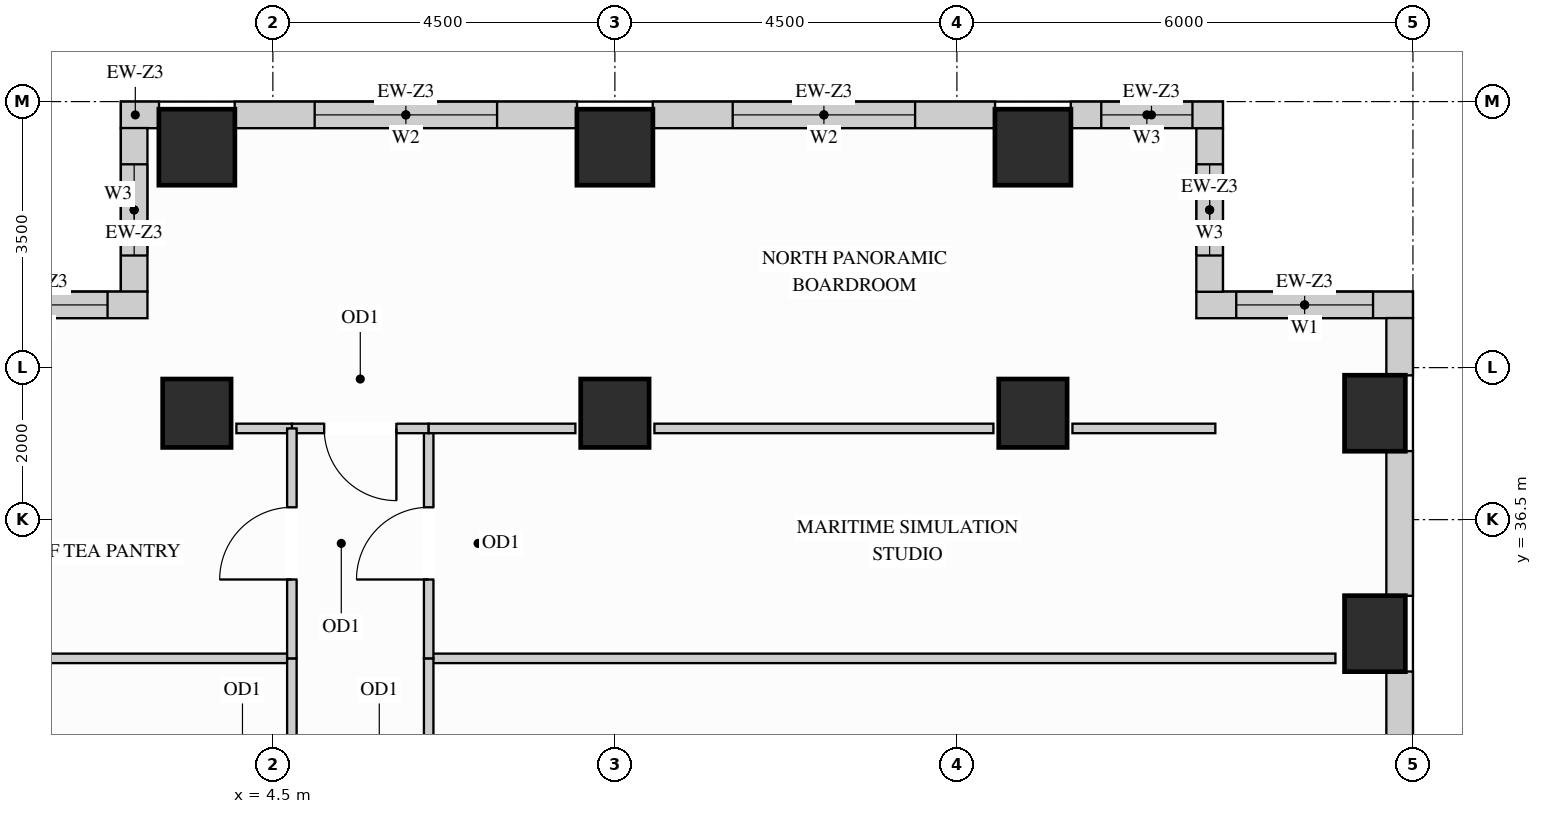
"""IFC4 building model, lengths in metres.
Left out: names, types, materials, properties, quantities, classifications, styles, units other than length and angle.
Written with IfcOpenShell. Run it as: python <this file> out.ifc"""

import sys

from ifc_helpers import new_model, si_unit, direction, frame, frame_2d, origin, origin_2d, place, context, subcontext, project, spatial, rectangle, extrude, source, transform, mapped, element, fill, save


model = new_model("IFC4")
c1 = context("Model", 3, precision=1e-05, world=origin(), true_north=direction((0.0, 1.0)))
c2 = subcontext(c1, "Body", "Model", "MODEL_VIEW")
j1 = project(units=[si_unit("LENGTHUNIT", "METRE"), si_unit("PLANEANGLEUNIT", "RADIAN")], contexts=[c1])
p1 = place(None, origin())
s1 = spatial("IfcSite", under=j1, at=p1, CompositionType="ELEMENT")
p2 = place(p1, origin())
s2 = spatial("IfcBuilding", under=s1, at=p2, CompositionType="ELEMENT")
p3 = place(p2, frame((0.0, 0.0, 168.3)))
s3 = spatial("IfcBuildingStorey", under=s2, at=p3, CompositionType="ELEMENT", Elevation=168.3)
m1 = source(origin(), c2, "Body", "SweptSolid", [
    extrude(rectangle(XDim=0.9, YDim=0.9, at=origin_2d()), origin(), (0.0, 0.0, 1.0), 3.4),
])
for number, where, z_axis, x_axis in (
    (1, (14.5, 37.9, 0.0), (0.0, 0.0, 1.0), (1.0, 0.0, 0.0)),
    (2, (3.5, 37.9, 0.0), (0.0, 0.0, 1.0), (1.0, 0.0, 0.0)),
    (3, (9.0, 37.9, 0.0), (0.0, 0.0, 1.0), (1.0, 0.0, 0.0)),
):
    element("IfcColumn", number, at=place(p3, frame(where, z_axis=z_axis, x_axis=x_axis)), inside=s3, PredefinedType="COLUMN", context=c2, shape_type="MappedRepresentation", body=[
        mapped(m1, transform((0.0, 0.0, 0.0), x_axis=(1.0, 0.0, 0.0), y_axis=(0.0, 1.0, 0.0), z_axis=(0.0, 0.0, 1.0))),
    ])
m2 = source(origin(), c2, "Body", "SweptSolid", [
    extrude(rectangle(XDim=0.8, YDim=1.0, at=origin_2d()), origin(), (0.0, 0.0, 1.0), 3.4),
])
for number, where, z_axis, x_axis in (
    (4, (19.0, 35.0, 0.0), (0.0, 0.0, 1.0), (1.0, 0.0, 0.0)),
    (5, (19.0, 37.9, 0.0), (0.0, 0.0, 1.0), (1.0, 0.0, 0.0)),
):
    element("IfcColumn", number, at=place(p3, frame(where, z_axis=z_axis, x_axis=x_axis)), inside=s3, PredefinedType="COLUMN", context=c2, shape_type="MappedRepresentation", body=[
        mapped(m2, transform((0.0, 0.0, 0.0), x_axis=(1.0, 0.0, 0.0), y_axis=(0.0, 1.0, 0.0), z_axis=(0.0, 0.0, 1.0))),
    ])
m3 = source(origin(), c2, "Body", "SweptSolid", [
    extrude(rectangle(XDim=1.0, YDim=1.0, at=origin_2d()), origin(), (0.0, 0.0, 1.0), 3.4),
])
for number, where, z_axis, x_axis in (
    (6, (14.5, 41.4, 0.0), (0.0, 0.0, 1.0), (1.0, 0.0, 0.0)),
    (7, (3.5, 41.4, 0.0), (0.0, 0.0, 1.0), (1.0, 0.0, 0.0)),
    (8, (9.0, 41.4, 0.0), (0.0, 0.0, 1.0), (1.0, 0.0, 0.0)),
):
    element("IfcColumn", number, at=place(p3, frame(where, z_axis=z_axis, x_axis=x_axis)), inside=s3, PredefinedType="COLUMN", context=c2, shape_type="MappedRepresentation", body=[
        mapped(m3, transform((0.0, 0.0, 0.0), x_axis=(1.0, 0.0, 0.0), y_axis=(0.0, 1.0, 0.0), z_axis=(0.0, 0.0, 1.0))),
    ])
p4 = place(p3, frame((19.5, 39.325, 0.0), z_axis=(0.0, 0.0, 1.0), x_axis=(-1.0, 0.0, 0.0)))
e9 = element("IfcWall", 9, at=p4, inside=s3, PredefinedType="SOLIDWALL", context=c2, shape_type="SweptSolid", body=[
    extrude(rectangle(XDim=2.85, YDim=0.35, at=frame_2d((1.425, 0.0))), origin(), (0.0, 0.0, 1.0), 3.385),
])
p5 = place(p4, frame((0.525, 0.0, 0.78)))
e10 = element("IfcOpeningElement", 10, at=p5, cuts=e9, PredefinedType="OPENING", context=c2, shape_type="SweptSolid", body=[
    extrude(rectangle(XDim=1.8, YDim=2.1, at=frame_2d((0.9, 1.05))), frame((0.0, 0.185, 0.0), z_axis=(0.0, -1.0, 0.0), x_axis=(1.0, 0.0, 0.0)), (0.0, 0.0, 1.0), 0.37),
])
p6 = place(p3, frame((16.825, 39.498, 0.0), z_axis=(0.0, 0.0, 1.0), x_axis=(0.0, 1.0, 0.0)))
e11 = element("IfcWall", 11, at=p6, inside=s3, PredefinedType="SOLIDWALL", context=c2, shape_type="SweptSolid", body=[
    extrude(rectangle(XDim=2.154, YDim=0.35, at=frame_2d((1.077, 0.0))), origin(), (0.0, 0.0, 1.0), 3.385),
])
p7 = place(p6, frame((0.477, 0.0, 0.78)))
e12 = element("IfcOpeningElement", 12, at=p7, cuts=e11, PredefinedType="OPENING", context=c2, shape_type="SweptSolid", body=[
    extrude(rectangle(XDim=1.2, YDim=2.1, at=frame_2d((0.6, 1.05))), frame((0.0, 0.185, 0.0), z_axis=(0.0, -1.0, 0.0), x_axis=(1.0, 0.0, 0.0)), (0.0, 0.0, 1.0), 0.37),
])
p8 = place(p3, frame((17.0, 41.825, 0.0), z_axis=(0.0, 0.0, 1.0), x_axis=(-1.0, 0.0, 0.0)))
e13 = element("IfcWall", 13, at=p8, inside=s3, PredefinedType="SOLIDWALL", context=c2, shape_type="SweptSolid", body=[
    extrude(rectangle(XDim=2.002, YDim=0.35, at=frame_2d((1.001, 0.0))), origin(), (0.0, 0.0, 1.0), 3.385),
])
p9 = place(p8, frame((0.401, 0.0, 0.78)))
e14 = element("IfcOpeningElement", 14, at=p9, cuts=e13, PredefinedType="OPENING", context=c2, shape_type="SweptSolid", body=[
    extrude(rectangle(XDim=1.2, YDim=2.1, at=frame_2d((0.6, 1.05))), frame((0.0, 0.185, 0.0), z_axis=(0.0, -1.0, 0.0), x_axis=(1.0, 0.0, 0.0)), (0.0, 0.0, 1.0), 0.37),
])
p10 = place(p3, frame((14.002, 41.825, 0.0), z_axis=(0.0, 0.0, 1.0), x_axis=(-1.0, 0.0, 0.0)))
e15 = element("IfcWall", 15, at=p10, inside=s3, PredefinedType="SOLIDWALL", context=c2, shape_type="SweptSolid", body=[
    extrude(rectangle(XDim=4.504, YDim=0.35, at=frame_2d((2.252, 0.0))), origin(), (0.0, 0.0, 1.0), 2.612),
])
p11 = place(p10, frame((1.052, 0.0, 0.78)))
e16 = element("IfcOpeningElement", 16, at=p11, cuts=e15, PredefinedType="OPENING", context=c2, shape_type="SweptSolid", body=[
    extrude(rectangle(XDim=2.4, YDim=1.652, at=frame_2d((1.2, 0.826))), frame((0.0, 0.185, 0.0), z_axis=(0.0, -1.0, 0.0), x_axis=(1.0, 0.0, 0.0)), (0.0, 0.0, 1.0), 0.37),
])
p12 = place(p3, frame((8.502, 41.825, 0.0), z_axis=(0.0, 0.0, 1.0), x_axis=(-1.0, 0.0, 0.0)))
e17 = element("IfcWall", 17, at=p12, inside=s3, PredefinedType="SOLIDWALL", context=c2, shape_type="SweptSolid", body=[
    extrude(rectangle(XDim=4.504, YDim=0.35, at=frame_2d((2.252, 0.0))), origin(), (0.0, 0.0, 1.0), 2.612),
])
p13 = place(p12, frame((1.052, 0.0, 0.78)))
e18 = element("IfcOpeningElement", 18, at=p13, cuts=e17, PredefinedType="OPENING", context=c2, shape_type="SweptSolid", body=[
    extrude(rectangle(XDim=2.4, YDim=1.652, at=frame_2d((1.2, 0.826))), frame((0.0, 0.185, 0.0), z_axis=(0.0, -1.0, 0.0), x_axis=(1.0, 0.0, 0.0)), (0.0, 0.0, 1.0), 0.37),
])
m4 = source(origin(), c2, "Body", "SweptSolid", [
    extrude(rectangle(XDim=0.502, YDim=0.35, at=frame_2d((0.251, 0.0))), origin(), (0.0, 0.0, 1.0), 3.385),
])
p14 = place(p3, frame((3.002, 41.825, 0.0), z_axis=(0.0, 0.0, 1.0), x_axis=(-1.0, 0.0, 0.0)))
e19 = element("IfcWall", 19, at=p14, inside=s3, PredefinedType="SOLIDWALL", context=c2, shape_type="MappedRepresentation", body=[
    mapped(m4, transform((0.0, 0.0, 0.0), x_axis=(1.0, 0.0, 0.0), y_axis=(0.0, 1.0, 0.0), z_axis=(0.0, 0.0, 1.0))),
])
p15 = place(p3, frame((2.675, 41.652, 0.0), z_axis=(0.0, 0.0, 1.0), x_axis=(0.0, -1.0, 0.0)))
e20 = element("IfcWall", 20, at=p15, inside=s3, PredefinedType="SOLIDWALL", context=c2, shape_type="SweptSolid", body=[
    extrude(rectangle(XDim=2.154, YDim=0.35, at=frame_2d((1.077, 0.0))), origin(), (0.0, 0.0, 1.0), 3.385),
])
p16 = place(p15, frame((0.477, 0.0, 0.78)))
e21 = element("IfcOpeningElement", 21, at=p16, cuts=e20, PredefinedType="OPENING", context=c2, shape_type="SweptSolid", body=[
    extrude(rectangle(XDim=1.2, YDim=2.1, at=frame_2d((0.6, 1.05))), frame((0.0, 0.185, 0.0), z_axis=(0.0, -1.0, 0.0), x_axis=(1.0, 0.0, 0.0)), (0.0, 0.0, 1.0), 0.37),
])
p17 = place(p3, frame((2.85, 39.325, 0.0), z_axis=(0.0, 0.0, 1.0), x_axis=(-1.0, 0.0, 0.0)))
e22 = element("IfcWall", 22, at=p17, inside=s3, PredefinedType="SOLIDWALL", context=c2, shape_type="SweptSolid", body=[
    extrude(rectangle(XDim=2.85, YDim=0.35, at=frame_2d((1.425, 0.0))), origin(), (0.0, 0.0, 1.0), 3.385),
])
p18 = place(p17, frame((0.525, 0.0, 0.78)))
e23 = element("IfcOpeningElement", 23, at=p18, cuts=e22, PredefinedType="OPENING", context=c2, shape_type="SweptSolid", body=[
    extrude(rectangle(XDim=1.8, YDim=2.1, at=frame_2d((0.9, 1.05))), frame((0.0, 0.185, 0.0), z_axis=(0.0, -1.0, 0.0), x_axis=(1.0, 0.0, 0.0)), (0.0, 0.0, 1.0), 0.37),
])
m5 = source(origin(), c2, "Body", "SweptSolid", [
    extrude(rectangle(XDim=3.504, YDim=0.35, at=frame_2d((1.752, 0.0))), origin(), (0.0, 0.0, 1.0), 2.612),
])
p19 = place(p3, frame((19.325, 30.998, 0.0), z_axis=(0.0, 0.0, 1.0), x_axis=(0.0, 1.0, 0.0)))
e24 = element("IfcWall", 24, at=p19, inside=s3, PredefinedType="SOLIDWALL", context=c2, shape_type="MappedRepresentation", body=[
    mapped(m5, transform((0.0, 0.0, 0.0), x_axis=(1.0, 0.0, 0.0), y_axis=(0.0, 1.0, 0.0), z_axis=(0.0, 0.0, 1.0))),
])
m6 = source(origin(), c2, "Body", "SweptSolid", [
    extrude(rectangle(XDim=1.904, YDim=0.35, at=frame_2d((0.952, 0.0))), origin(), (0.0, 0.0, 1.0), 2.612),
])
p20 = place(p3, frame((19.325, 35.498, 0.0), z_axis=(0.0, 0.0, 1.0), x_axis=(0.0, 1.0, 0.0)))
e25 = element("IfcWall", 25, at=p20, inside=s3, PredefinedType="SOLIDWALL", context=c2, shape_type="MappedRepresentation", body=[
    mapped(m6, transform((0.0, 0.0, 0.0), x_axis=(1.0, 0.0, 0.0), y_axis=(0.0, 1.0, 0.0), z_axis=(0.0, 0.0, 1.0))),
])
m7 = source(origin(), c2, "Body", "SweptSolid", [
    extrude(rectangle(XDim=0.754, YDim=0.35, at=frame_2d((0.377, 0.0))), origin(), (0.0, 0.0, 1.0), 3.385),
])
p21 = place(p3, frame((19.325, 38.398, 0.0), z_axis=(0.0, 0.0, 1.0), x_axis=(0.0, 1.0, 0.0)))
e26 = element("IfcWall", 26, at=p21, inside=s3, PredefinedType="SOLIDWALL", context=c2, shape_type="MappedRepresentation", body=[
    mapped(m7, transform((0.0, 0.0, 0.0), x_axis=(1.0, 0.0, 0.0), y_axis=(0.0, 1.0, 0.0), z_axis=(0.0, 0.0, 1.0))),
])
m8 = source(origin(), c2, "Body", "SweptSolid", [
    extrude(rectangle(XDim=11.93, YDim=0.125, at=frame_2d((5.965, 0.0))), origin(), (0.0, 0.0, 1.0), 2.448),
])
p22 = place(p3, frame((6.55, 34.675, 0.0), z_axis=(0.0, 0.0, 1.0), x_axis=(1.0, 0.0, 0.0)))
e27 = element("IfcWall", 27, at=p22, inside=s3, PredefinedType="PARTITIONING", context=c2, shape_type="MappedRepresentation", body=[
    mapped(m8, transform((0.0, 0.0, 0.0), x_axis=(1.0, 0.0, 0.0), y_axis=(0.0, 1.0, 0.0), z_axis=(0.0, 0.0, 1.0))),
])
m9 = source(origin(), c2, "Body", "SweptSolid", [
    extrude(rectangle(XDim=3.63, YDim=0.125, at=frame_2d((1.815, 0.0))), origin(), (0.0, 0.0, 1.0), 2.448),
])
p23 = place(p3, frame((1.12, 34.675, 0.0), z_axis=(0.0, 0.0, 1.0), x_axis=(1.0, 0.0, 0.0)))
e28 = element("IfcWall", 28, at=p23, inside=s3, PredefinedType="PARTITIONING", context=c2, shape_type="MappedRepresentation", body=[
    mapped(m9, transform((0.0, 0.0, 0.0), x_axis=(1.0, 0.0, 0.0), y_axis=(0.0, 1.0, 0.0), z_axis=(0.0, 0.0, 1.0))),
])
p24 = place(p3, frame((6.55, 31.65, 0.0), z_axis=(0.0, 0.0, 1.0), x_axis=(0.0, 1.0, 0.0)))
e29 = element("IfcWall", 29, at=p24, inside=s3, PredefinedType="PARTITIONING", context=c2, shape_type="SweptSolid", body=[
    extrude(rectangle(XDim=3.025, YDim=0.125, at=frame_2d((1.513, 0.0))), origin(), (0.0, 0.0, 1.0), 3.385),
])
p25 = place(p24, frame((1.038, 0.0, 0.0)))
e30 = element("IfcOpeningElement", 30, at=p25, cuts=e29, PredefinedType="OPENING", context=c2, shape_type="SweptSolid", body=[
    extrude(rectangle(XDim=0.95, YDim=2.15, at=frame_2d((0.475, 1.075))), frame((0.0, 0.073, 0.0), z_axis=(0.0, -1.0, 0.0), x_axis=(1.0, 0.0, 0.0)), (0.0, 0.0, 1.0), 0.145),
])
p26 = place(p3, frame((6.55, 34.675, 0.0), z_axis=(0.0, 0.0, 1.0), x_axis=(0.0, 1.0, 0.0)))
e31 = element("IfcWall", 31, at=p26, inside=s3, PredefinedType="PARTITIONING", context=c2, shape_type="SweptSolid", body=[
    extrude(rectangle(XDim=3.025, YDim=0.125, at=frame_2d((1.512, 0.0))), origin(), (0.0, 0.0, 1.0), 3.385),
])
p27 = place(p26, frame((1.038, 0.0, 0.0)))
e32 = element("IfcOpeningElement", 32, at=p27, cuts=e31, PredefinedType="OPENING", context=c2, shape_type="SweptSolid", body=[
    extrude(rectangle(XDim=0.95, YDim=2.15, at=frame_2d((0.475, 1.075))), frame((0.0, 0.073, 0.0), z_axis=(0.0, -1.0, 0.0), x_axis=(1.0, 0.0, 0.0)), (0.0, 0.0, 1.0), 0.145),
])
p28 = place(p3, frame((4.75, 37.7, 0.0), z_axis=(0.0, 0.0, 1.0), x_axis=(1.0, 0.0, 0.0)))
e33 = element("IfcWall", 33, at=p28, inside=s3, PredefinedType="PARTITIONING", context=c2, shape_type="SweptSolid", body=[
    extrude(rectangle(XDim=1.8, YDim=0.125, at=frame_2d((0.9, 0.0))), origin(), (0.0, 0.0, 1.0), 2.773),
])
p29 = place(p28, frame((0.425, 0.0, 0.0)))
e34 = element("IfcOpeningElement", 34, at=p29, cuts=e33, PredefinedType="OPENING", context=c2, shape_type="SweptSolid", body=[
    extrude(rectangle(XDim=0.95, YDim=2.15, at=frame_2d((0.475, 1.075))), frame((0.0, 0.073, 0.0), z_axis=(0.0, -1.0, 0.0), x_axis=(1.0, 0.0, 0.0)), (0.0, 0.0, 1.0), 0.145),
])
m10 = source(origin(), c2, "Body", "SweptSolid", [
    extrude(rectangle(XDim=1.93, YDim=0.125, at=frame_2d((0.965, 0.0))), origin(), (0.0, 0.0, 1.0), 2.773),
])
p30 = place(p3, frame((6.55, 37.7, 0.0), z_axis=(0.0, 0.0, 1.0), x_axis=(1.0, 0.0, 0.0)))
e35 = element("IfcWall", 35, at=p30, inside=s3, PredefinedType="PARTITIONING", context=c2, shape_type="MappedRepresentation", body=[
    mapped(m10, transform((0.0, 0.0, 0.0), x_axis=(1.0, 0.0, 0.0), y_axis=(0.0, 1.0, 0.0), z_axis=(0.0, 0.0, 1.0))),
])
m11 = source(origin(), c2, "Body", "SweptSolid", [
    extrude(rectangle(XDim=4.46, YDim=0.125, at=frame_2d((2.23, 0.0))), origin(), (0.0, 0.0, 1.0), 2.773),
])
p31 = place(p3, frame((9.52, 37.7, 0.0), z_axis=(0.0, 0.0, 1.0), x_axis=(1.0, 0.0, 0.0)))
e36 = element("IfcWall", 36, at=p31, inside=s3, PredefinedType="PARTITIONING", context=c2, shape_type="MappedRepresentation", body=[
    mapped(m11, transform((0.0, 0.0, 0.0), x_axis=(1.0, 0.0, 0.0), y_axis=(0.0, 1.0, 0.0), z_axis=(0.0, 0.0, 1.0))),
])
m12 = source(origin(), c2, "Body", "SweptSolid", [
    extrude(rectangle(XDim=1.88, YDim=0.125, at=frame_2d((0.94, 0.0))), origin(), (0.0, 0.0, 1.0), 2.773),
])
p32 = place(p3, frame((15.02, 37.7, 0.0), z_axis=(0.0, 0.0, 1.0), x_axis=(1.0, 0.0, 0.0)))
e37 = element("IfcWall", 37, at=p32, inside=s3, PredefinedType="PARTITIONING", context=c2, shape_type="MappedRepresentation", body=[
    mapped(m12, transform((0.0, 0.0, 0.0), x_axis=(1.0, 0.0, 0.0), y_axis=(0.0, 1.0, 0.0), z_axis=(0.0, 0.0, 1.0))),
])
m13 = source(origin(), c2, "Body", "SweptSolid", [
    extrude(rectangle(XDim=0.73, YDim=0.125, at=frame_2d((0.365, 0.0))), origin(), (0.0, 0.0, 1.0), 2.773),
])
p33 = place(p3, frame((4.02, 37.7, 0.0), z_axis=(0.0, 0.0, 1.0), x_axis=(1.0, 0.0, 0.0)))
e38 = element("IfcWall", 38, at=p33, inside=s3, PredefinedType="PARTITIONING", context=c2, shape_type="MappedRepresentation", body=[
    mapped(m13, transform((0.0, 0.0, 0.0), x_axis=(1.0, 0.0, 0.0), y_axis=(0.0, 1.0, 0.0), z_axis=(0.0, 0.0, 1.0))),
])
p34 = place(p3, frame((4.75, 31.65, 0.0), z_axis=(0.0, 0.0, 1.0), x_axis=(0.0, 1.0, 0.0)))
e39 = element("IfcWall", 39, at=p34, inside=s3, PredefinedType="PARTITIONING", context=c2, shape_type="SweptSolid", body=[
    extrude(rectangle(XDim=3.025, YDim=0.125, at=frame_2d((1.513, 0.0))), origin(), (0.0, 0.0, 1.0), 3.385),
])
p35 = place(p34, frame((1.038, 0.0, 0.0)))
e40 = element("IfcOpeningElement", 40, at=p35, cuts=e39, PredefinedType="OPENING", context=c2, shape_type="SweptSolid", body=[
    extrude(rectangle(XDim=0.95, YDim=2.15, at=frame_2d((0.475, 1.075))), frame((0.0, 0.073, 0.0), z_axis=(0.0, -1.0, 0.0), x_axis=(1.0, 0.0, 0.0)), (0.0, 0.0, 1.0), 0.145),
])
p36 = place(p3, frame((4.75, 34.675, 0.0), z_axis=(0.0, 0.0, 1.0), x_axis=(0.0, 1.0, 0.0)))
e41 = element("IfcWall", 41, at=p36, inside=s3, PredefinedType="PARTITIONING", context=c2, shape_type="SweptSolid", body=[
    extrude(rectangle(XDim=3.025, YDim=0.125, at=frame_2d((1.512, 0.0))), origin(), (0.0, 0.0, 1.0), 3.385),
])
p37 = place(p36, frame((1.038, 0.0, 0.0)))
e42 = element("IfcOpeningElement", 42, at=p37, cuts=e41, PredefinedType="OPENING", context=c2, shape_type="SweptSolid", body=[
    extrude(rectangle(XDim=0.95, YDim=2.15, at=frame_2d((0.475, 1.075))), frame((0.0, 0.073, 0.0), z_axis=(0.0, -1.0, 0.0), x_axis=(1.0, 0.0, 0.0)), (0.0, 0.0, 1.0), 0.145),
])
m14 = source(origin(), c2, "Body", "SweptSolid", [
    extrude(rectangle(XDim=0.95, YDim=2.15, at=frame_2d((0.475, 1.075))), frame((0.0, 0.025, 0.0), z_axis=(0.0, -1.0, 0.0), x_axis=(1.0, 0.0, 0.0)), (0.0, 0.0, 1.0), 0.05),
])
p38 = place(p27, origin())
e43 = element("IfcDoor", 43, at=p38, inside=s3, OperationType="SINGLE_SWING_LEFT", PredefinedType="DOOR", context=c2, shape_type="MappedRepresentation", body=[
    mapped(m14, transform((0.0, 0.0, 0.0), x_axis=(1.0, 0.0, 0.0), y_axis=(0.0, 1.0, 0.0), z_axis=(0.0, 0.0, 1.0))),
])
fill(e32, e43)
p39 = place(p29, origin())
e44 = element("IfcDoor", 44, at=p39, inside=s3, OperationType="SINGLE_SWING_RIGHT", PredefinedType="DOOR", context=c2, shape_type="MappedRepresentation", body=[
    mapped(m14, transform((0.0, 0.0, 0.0), x_axis=(1.0, 0.0, 0.0), y_axis=(0.0, 1.0, 0.0), z_axis=(0.0, 0.0, 1.0))),
])
fill(e34, e44)
p40 = place(p37, origin())
e45 = element("IfcDoor", 45, at=p40, inside=s3, OperationType="SINGLE_SWING_LEFT", PredefinedType="DOOR", context=c2, shape_type="MappedRepresentation", body=[
    mapped(m14, transform((0.0, 0.0, 0.0), x_axis=(1.0, 0.0, 0.0), y_axis=(0.0, 1.0, 0.0), z_axis=(0.0, 0.0, 1.0))),
])
fill(e42, e45)
m15 = source(origin(), c2, "Body", "SweptSolid", [
    extrude(rectangle(XDim=1.8, YDim=2.1, at=frame_2d((0.9, 1.05))), frame((0.0, 0.03, 0.0), z_axis=(0.0, -1.0, 0.0), x_axis=(1.0, 0.0, 0.0)), (0.0, 0.0, 1.0), 0.06),
])
p41 = place(p5, origin())
e46 = element("IfcWindow", 46, at=p41, inside=s3, PartitioningType="SINGLE_PANEL", PredefinedType="WINDOW", context=c2, shape_type="MappedRepresentation", body=[
    mapped(m15, transform((0.0, 0.0, 0.0), x_axis=(1.0, 0.0, 0.0), y_axis=(0.0, 1.0, 0.0), z_axis=(0.0, 0.0, 1.0))),
])
fill(e10, e46)
p42 = place(p18, origin())
e47 = element("IfcWindow", 47, at=p42, inside=s3, PartitioningType="SINGLE_PANEL", PredefinedType="WINDOW", context=c2, shape_type="MappedRepresentation", body=[
    mapped(m15, transform((0.0, 0.0, 0.0), x_axis=(1.0, 0.0, 0.0), y_axis=(0.0, 1.0, 0.0), z_axis=(0.0, 0.0, 1.0))),
])
fill(e23, e47)
m16 = source(origin(), c2, "Body", "SweptSolid", [
    extrude(rectangle(XDim=2.4, YDim=1.652, at=frame_2d((1.2, 0.826))), frame((0.0, 0.03, 0.0), z_axis=(0.0, -1.0, 0.0), x_axis=(1.0, 0.0, 0.0)), (0.0, 0.0, 1.0), 0.06),
])
p43 = place(p11, origin())
e48 = element("IfcWindow", 48, at=p43, inside=s3, PartitioningType="SINGLE_PANEL", PredefinedType="WINDOW", context=c2, shape_type="MappedRepresentation", body=[
    mapped(m16, transform((0.0, 0.0, 0.0), x_axis=(1.0, 0.0, 0.0), y_axis=(0.0, 1.0, 0.0), z_axis=(0.0, 0.0, 1.0))),
])
fill(e16, e48)
p44 = place(p13, origin())
e49 = element("IfcWindow", 49, at=p44, inside=s3, PartitioningType="SINGLE_PANEL", PredefinedType="WINDOW", context=c2, shape_type="MappedRepresentation", body=[
    mapped(m16, transform((0.0, 0.0, 0.0), x_axis=(1.0, 0.0, 0.0), y_axis=(0.0, 1.0, 0.0), z_axis=(0.0, 0.0, 1.0))),
])
fill(e18, e49)
m17 = source(origin(), c2, "Body", "SweptSolid", [
    extrude(rectangle(XDim=1.2, YDim=2.1, at=frame_2d((0.6, 1.05))), frame((0.0, 0.03, 0.0), z_axis=(0.0, -1.0, 0.0), x_axis=(1.0, 0.0, 0.0)), (0.0, 0.0, 1.0), 0.06),
])
p45 = place(p7, origin())
e50 = element("IfcWindow", 50, at=p45, inside=s3, PartitioningType="SINGLE_PANEL", PredefinedType="WINDOW", context=c2, shape_type="MappedRepresentation", body=[
    mapped(m17, transform((0.0, 0.0, 0.0), x_axis=(1.0, 0.0, 0.0), y_axis=(0.0, 1.0, 0.0), z_axis=(0.0, 0.0, 1.0))),
])
fill(e12, e50)
p46 = place(p9, origin())
e51 = element("IfcWindow", 51, at=p46, inside=s3, PartitioningType="SINGLE_PANEL", PredefinedType="WINDOW", context=c2, shape_type="MappedRepresentation", body=[
    mapped(m17, transform((0.0, 0.0, 0.0), x_axis=(1.0, 0.0, 0.0), y_axis=(0.0, 1.0, 0.0), z_axis=(0.0, 0.0, 1.0))),
])
fill(e14, e51)
p47 = place(p16, origin())
e52 = element("IfcWindow", 52, at=p47, inside=s3, PartitioningType="SINGLE_PANEL", PredefinedType="WINDOW", context=c2, shape_type="MappedRepresentation", body=[
    mapped(m17, transform((0.0, 0.0, 0.0), x_axis=(1.0, 0.0, 0.0), y_axis=(0.0, 1.0, 0.0), z_axis=(0.0, 0.0, 1.0))),
])
fill(e21, e52)
save(model, sys.argv[1])
